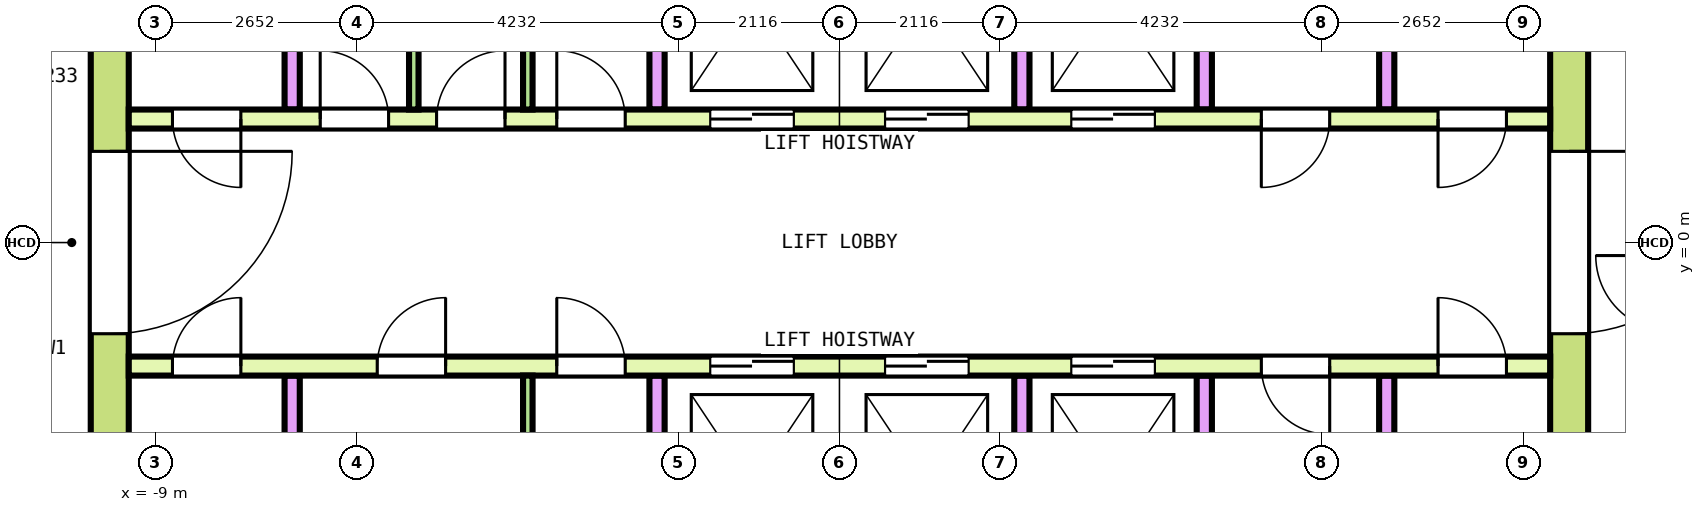
"""IFC4 building model, lengths in metres.
Left out: names, types, materials, properties, quantities, classifications, styles, units other than length and angle.
Written with IfcOpenShell. Run it as: python <this file> out.ifc"""

import sys

from ifc_helpers import new_model, si_unit, direction, frame, frame_2d, origin, place, context, subcontext, project, spatial, rectangle, extrude, element, fill, save


model = new_model("IFC4")
c1 = context("Model", 3, precision=1e-05, world=origin(), true_north=direction((0.0, 1.0)))
c2 = subcontext(c1, "Body", "Model", "MODEL_VIEW")
j1 = project(units=[si_unit("LENGTHUNIT", "METRE"), si_unit("PLANEANGLEUNIT", "RADIAN")], contexts=[c1])
p1 = place(None, origin())
s1 = spatial("IfcSite", under=j1, at=p1, CompositionType="ELEMENT")
p2 = place(p1, origin())
s2 = spatial("IfcBuilding", under=s1, at=p2, CompositionType="ELEMENT")
p3 = place(p2, frame((0.0, 0.0, 291.0)))
s3 = spatial("IfcBuildingStorey", under=s2, at=p3, CompositionType="ELEMENT", Elevation=291.0)
p4 = place(p3, frame((-9.6, -7.85, 0.0), z_axis=(0.0, 0.0, 1.0), x_axis=(0.0, 1.0, 0.0)))
e1 = element("IfcWall", 1, at=p4, inside=s3, PredefinedType="SHEAR", context=c2, shape_type="SweptSolid", body=[
    extrude(rectangle(XDim=15.7, YDim=0.5, at=frame_2d((7.85, 0.0))), origin(), (0.0, 0.0, 1.0), 3.7),
])
p5 = place(p4, frame((6.65, 0.0, 0.0)))
e2 = element("IfcOpeningElement", 2, at=p5, cuts=e1, PredefinedType="OPENING", context=c2, shape_type="SweptSolid", body=[
    extrude(rectangle(XDim=2.4, YDim=2.1, at=frame_2d((1.2, 1.05))), frame((0.0, 0.26, 0.0), z_axis=(0.0, -1.0, 0.0), x_axis=(1.0, 0.0, 0.0)), (0.0, 0.0, 1.0), 0.52),
])
p6 = place(p4, frame((13.55, 0.0, 0.0)))
e3 = element("IfcOpeningElement", 3, at=p6, cuts=e1, PredefinedType="OPENING", context=c2, shape_type="SweptSolid", body=[
    extrude(rectangle(XDim=1.2, YDim=2.1, at=frame_2d((0.6, 1.05))), frame((0.0, 0.26, 0.0), z_axis=(0.0, -1.0, 0.0), x_axis=(1.0, 0.0, 0.0)), (0.0, 0.0, 1.0), 0.52),
])
p7 = place(p4, frame((0.95, 0.0, 0.0)))
e4 = element("IfcOpeningElement", 4, at=p7, cuts=e1, PredefinedType="OPENING", context=c2, shape_type="SweptSolid", body=[
    extrude(rectangle(XDim=1.2, YDim=2.1, at=frame_2d((0.6, 1.05))), frame((0.0, 0.26, 0.0), z_axis=(0.0, -1.0, 0.0), x_axis=(1.0, 0.0, 0.0)), (0.0, 0.0, 1.0), 0.52),
])
p8 = place(p3, frame((9.6, -7.85, 0.0), z_axis=(0.0, 0.0, 1.0), x_axis=(0.0, 1.0, 0.0)))
e5 = element("IfcWall", 5, at=p8, inside=s3, PredefinedType="SHEAR", context=c2, shape_type="SweptSolid", body=[
    extrude(rectangle(XDim=15.7, YDim=0.5, at=frame_2d((7.85, 0.0))), origin(), (0.0, 0.0, 1.0), 3.7),
])
p9 = place(p8, frame((6.65, 0.0, 0.0)))
e6 = element("IfcOpeningElement", 6, at=p9, cuts=e5, PredefinedType="OPENING", context=c2, shape_type="SweptSolid", body=[
    extrude(rectangle(XDim=2.4, YDim=2.1, at=frame_2d((1.2, 1.05))), frame((0.0, 0.26, 0.0), z_axis=(0.0, -1.0, 0.0), x_axis=(1.0, 0.0, 0.0)), (0.0, 0.0, 1.0), 0.52),
])
p10 = place(p8, frame((13.55, 0.0, 0.0)))
e7 = element("IfcOpeningElement", 7, at=p10, cuts=e5, PredefinedType="OPENING", context=c2, shape_type="SweptSolid", body=[
    extrude(rectangle(XDim=1.2, YDim=2.1, at=frame_2d((0.6, 1.05))), frame((0.0, 0.26, 0.0), z_axis=(0.0, -1.0, 0.0), x_axis=(1.0, 0.0, 0.0)), (0.0, 0.0, 1.0), 0.52),
])
p11 = place(p8, frame((1.05, 0.0, 0.0)))
e8 = element("IfcOpeningElement", 8, at=p11, cuts=e5, PredefinedType="OPENING", context=c2, shape_type="SweptSolid", body=[
    extrude(rectangle(XDim=1.0, YDim=2.1, at=frame_2d((0.5, 1.05))), frame((0.0, 0.26, 0.0), z_axis=(0.0, -1.0, 0.0), x_axis=(1.0, 0.0, 0.0)), (0.0, 0.0, 1.0), 0.52),
])
p12 = place(p3, frame((-9.35, 1.625, 0.0), z_axis=(0.0, 0.0, 1.0), x_axis=(1.0, 0.0, 0.0)))
e9 = element("IfcWall", 9, at=p12, inside=s3, PredefinedType="SOLIDWALL", context=c2, shape_type="SweptSolid", body=[
    extrude(rectangle(XDim=18.7, YDim=0.25, at=frame_2d((9.35, 0.0))), origin(), (0.0, 0.0, 1.0), 3.7),
])
p13 = place(p12, frame((7.65, 0.0, 0.0)))
e10 = element("IfcOpeningElement", 10, at=p13, cuts=e9, PredefinedType="OPENING", context=c2, shape_type="SweptSolid", body=[
    extrude(rectangle(XDim=1.1, YDim=2.1, at=frame_2d((0.55, 1.05))), frame((0.0, 0.135, 0.0), z_axis=(0.0, -1.0, 0.0), x_axis=(1.0, 0.0, 0.0)), (0.0, 0.0, 1.0), 0.27),
])
p14 = place(p12, frame((9.95, 0.0, 0.0)))
e11 = element("IfcOpeningElement", 11, at=p14, cuts=e9, PredefinedType="OPENING", context=c2, shape_type="SweptSolid", body=[
    extrude(rectangle(XDim=1.1, YDim=2.1, at=frame_2d((0.55, 1.05))), frame((0.0, 0.135, 0.0), z_axis=(0.0, -1.0, 0.0), x_axis=(1.0, 0.0, 0.0)), (0.0, 0.0, 1.0), 0.27),
])
p15 = place(p12, frame((12.4, 0.0, 0.0)))
e12 = element("IfcOpeningElement", 12, at=p15, cuts=e9, PredefinedType="OPENING", context=c2, shape_type="SweptSolid", body=[
    extrude(rectangle(XDim=1.1, YDim=2.1, at=frame_2d((0.55, 1.05))), frame((0.0, 0.135, 0.0), z_axis=(0.0, -1.0, 0.0), x_axis=(1.0, 0.0, 0.0)), (0.0, 0.0, 1.0), 0.27),
])
p16 = place(p12, frame((0.575, 0.0, 0.0)))
e13 = element("IfcOpeningElement", 13, at=p16, cuts=e9, PredefinedType="OPENING", context=c2, shape_type="SweptSolid", body=[
    extrude(rectangle(XDim=0.9, YDim=2.1, at=frame_2d((0.45, 1.05))), frame((0.0, 0.135, 0.0), z_axis=(0.0, -1.0, 0.0), x_axis=(1.0, 0.0, 0.0)), (0.0, 0.0, 1.0), 0.27),
])
p17 = place(p12, frame((2.519, 0.0, 0.0)))
e14 = element("IfcOpeningElement", 14, at=p17, cuts=e9, PredefinedType="OPENING", context=c2, shape_type="SweptSolid", body=[
    extrude(rectangle(XDim=0.9, YDim=2.1, at=frame_2d((0.45, 1.05))), frame((0.0, 0.135, 0.0), z_axis=(0.0, -1.0, 0.0), x_axis=(1.0, 0.0, 0.0)), (0.0, 0.0, 1.0), 0.27),
])
p18 = place(p12, frame((4.05, 0.0, 0.0)))
e15 = element("IfcOpeningElement", 15, at=p18, cuts=e9, PredefinedType="OPENING", context=c2, shape_type="SweptSolid", body=[
    extrude(rectangle(XDim=0.9, YDim=2.1, at=frame_2d((0.45, 1.05))), frame((0.0, 0.135, 0.0), z_axis=(0.0, -1.0, 0.0), x_axis=(1.0, 0.0, 0.0)), (0.0, 0.0, 1.0), 0.27),
])
p19 = place(p12, frame((5.631, 0.0, 0.0)))
e16 = element("IfcOpeningElement", 16, at=p19, cuts=e9, PredefinedType="OPENING", context=c2, shape_type="SweptSolid", body=[
    extrude(rectangle(XDim=0.9, YDim=2.1, at=frame_2d((0.45, 1.05))), frame((0.0, 0.135, 0.0), z_axis=(0.0, -1.0, 0.0), x_axis=(1.0, 0.0, 0.0)), (0.0, 0.0, 1.0), 0.27),
])
p20 = place(p12, frame((14.9, 0.0, 0.0)))
e17 = element("IfcOpeningElement", 17, at=p20, cuts=e9, PredefinedType="OPENING", context=c2, shape_type="SweptSolid", body=[
    extrude(rectangle(XDim=0.9, YDim=2.1, at=frame_2d((0.45, 1.05))), frame((0.0, 0.135, 0.0), z_axis=(0.0, -1.0, 0.0), x_axis=(1.0, 0.0, 0.0)), (0.0, 0.0, 1.0), 0.27),
])
p21 = place(p12, frame((17.225, 0.0, 0.0)))
e18 = element("IfcOpeningElement", 18, at=p21, cuts=e9, PredefinedType="OPENING", context=c2, shape_type="SweptSolid", body=[
    extrude(rectangle(XDim=0.9, YDim=2.1, at=frame_2d((0.45, 1.05))), frame((0.0, 0.135, 0.0), z_axis=(0.0, -1.0, 0.0), x_axis=(1.0, 0.0, 0.0)), (0.0, 0.0, 1.0), 0.27),
])
for number, where, z_axis, x_axis in (
    (19, (-7.2, 1.75, 0.0), (0.0, 0.0, 1.0), (0.0, 1.0, 0.0)),
    (20, (-2.4, 1.75, 0.0), (0.0, 0.0, 1.0), (0.0, 1.0, 0.0)),
    (21, (2.4, 1.75, 0.0), (0.0, 0.0, 1.0), (0.0, 1.0, 0.0)),
    (22, (4.8, 1.75, 0.0), (0.0, 0.0, 1.0), (0.0, 1.0, 0.0)),
    (23, (7.2, 1.75, 0.0), (0.0, 0.0, 1.0), (0.0, 1.0, 0.0)),
):
    element("IfcWall", number, at=place(p3, frame(where, z_axis=z_axis, x_axis=x_axis)), inside=s3, PredefinedType="SOLIDWALL", context=c2, shape_type="SweptSolid", body=[
        extrude(rectangle(XDim=2.9, YDim=0.2, at=frame_2d((1.45, 0.0))), origin(), (0.0, 0.0, 1.0), 3.7),
    ])
p22 = place(p3, frame((-9.35, -1.625, 0.0), z_axis=(0.0, 0.0, 1.0), x_axis=(1.0, 0.0, 0.0)))
e24 = element("IfcWall", 24, at=p22, inside=s3, PredefinedType="SOLIDWALL", context=c2, shape_type="SweptSolid", body=[
    extrude(rectangle(XDim=18.7, YDim=0.25, at=frame_2d((9.35, 0.0))), origin(), (0.0, 0.0, 1.0), 3.7),
])
p23 = place(p22, frame((7.65, 0.0, 0.0)))
e25 = element("IfcOpeningElement", 25, at=p23, cuts=e24, PredefinedType="OPENING", context=c2, shape_type="SweptSolid", body=[
    extrude(rectangle(XDim=1.1, YDim=2.1, at=frame_2d((0.55, 1.05))), frame((0.0, 0.135, 0.0), z_axis=(0.0, -1.0, 0.0), x_axis=(1.0, 0.0, 0.0)), (0.0, 0.0, 1.0), 0.27),
])
p24 = place(p22, frame((9.95, 0.0, 0.0)))
e26 = element("IfcOpeningElement", 26, at=p24, cuts=e24, PredefinedType="OPENING", context=c2, shape_type="SweptSolid", body=[
    extrude(rectangle(XDim=1.1, YDim=2.1, at=frame_2d((0.55, 1.05))), frame((0.0, 0.135, 0.0), z_axis=(0.0, -1.0, 0.0), x_axis=(1.0, 0.0, 0.0)), (0.0, 0.0, 1.0), 0.27),
])
p25 = place(p22, frame((12.4, 0.0, 0.0)))
e27 = element("IfcOpeningElement", 27, at=p25, cuts=e24, PredefinedType="OPENING", context=c2, shape_type="SweptSolid", body=[
    extrude(rectangle(XDim=1.1, YDim=2.1, at=frame_2d((0.55, 1.05))), frame((0.0, 0.135, 0.0), z_axis=(0.0, -1.0, 0.0), x_axis=(1.0, 0.0, 0.0)), (0.0, 0.0, 1.0), 0.27),
])
p26 = place(p22, frame((0.575, 0.0, 0.0)))
e28 = element("IfcOpeningElement", 28, at=p26, cuts=e24, PredefinedType="OPENING", context=c2, shape_type="SweptSolid", body=[
    extrude(rectangle(XDim=0.9, YDim=2.1, at=frame_2d((0.45, 1.05))), frame((0.0, 0.135, 0.0), z_axis=(0.0, -1.0, 0.0), x_axis=(1.0, 0.0, 0.0)), (0.0, 0.0, 1.0), 0.27),
])
p27 = place(p22, frame((3.269, 0.0, 0.0)))
e29 = element("IfcOpeningElement", 29, at=p27, cuts=e24, PredefinedType="OPENING", context=c2, shape_type="SweptSolid", body=[
    extrude(rectangle(XDim=0.9, YDim=2.1, at=frame_2d((0.45, 1.05))), frame((0.0, 0.135, 0.0), z_axis=(0.0, -1.0, 0.0), x_axis=(1.0, 0.0, 0.0)), (0.0, 0.0, 1.0), 0.27),
])
p28 = place(p22, frame((5.631, 0.0, 0.0)))
e30 = element("IfcOpeningElement", 30, at=p28, cuts=e24, PredefinedType="OPENING", context=c2, shape_type="SweptSolid", body=[
    extrude(rectangle(XDim=0.9, YDim=2.1, at=frame_2d((0.45, 1.05))), frame((0.0, 0.135, 0.0), z_axis=(0.0, -1.0, 0.0), x_axis=(1.0, 0.0, 0.0)), (0.0, 0.0, 1.0), 0.27),
])
p29 = place(p22, frame((14.9, 0.0, 0.0)))
e31 = element("IfcOpeningElement", 31, at=p29, cuts=e24, PredefinedType="OPENING", context=c2, shape_type="SweptSolid", body=[
    extrude(rectangle(XDim=0.9, YDim=2.1, at=frame_2d((0.45, 1.05))), frame((0.0, 0.135, 0.0), z_axis=(0.0, -1.0, 0.0), x_axis=(1.0, 0.0, 0.0)), (0.0, 0.0, 1.0), 0.27),
])
p30 = place(p22, frame((17.225, 0.0, 0.0)))
e32 = element("IfcOpeningElement", 32, at=p30, cuts=e24, PredefinedType="OPENING", context=c2, shape_type="SweptSolid", body=[
    extrude(rectangle(XDim=0.9, YDim=2.1, at=frame_2d((0.45, 1.05))), frame((0.0, 0.135, 0.0), z_axis=(0.0, -1.0, 0.0), x_axis=(1.0, 0.0, 0.0)), (0.0, 0.0, 1.0), 0.27),
])
for number, where, z_axis, x_axis in (
    (33, (-7.2, -4.65, 0.0), (0.0, 0.0, 1.0), (0.0, 1.0, 0.0)),
    (34, (-2.4, -4.65, 0.0), (0.0, 0.0, 1.0), (0.0, 1.0, 0.0)),
    (35, (2.4, -4.65, 0.0), (0.0, 0.0, 1.0), (0.0, 1.0, 0.0)),
    (36, (4.8, -4.65, 0.0), (0.0, 0.0, 1.0), (0.0, 1.0, 0.0)),
    (37, (7.2, -4.65, 0.0), (0.0, 0.0, 1.0), (0.0, 1.0, 0.0)),
):
    element("IfcWall", number, at=place(p3, frame(where, z_axis=z_axis, x_axis=x_axis)), inside=s3, PredefinedType="SOLIDWALL", context=c2, shape_type="SweptSolid", body=[
        extrude(rectangle(XDim=2.9, YDim=0.2, at=frame_2d((1.45, 0.0))), origin(), (0.0, 0.0, 1.0), 3.7),
    ])
for number, where, z_axis, x_axis in (
    (38, (-5.6, 1.75, 0.0), (0.0, 0.0, 1.0), (0.0, 1.0, 0.0)),
    (39, (-4.1, 1.75, 0.0), (0.0, 0.0, 1.0), (0.0, 1.0, 0.0)),
    (40, (-4.1, -4.65, 0.0), (0.0, 0.0, 1.0), (0.0, 1.0, 0.0)),
):
    element("IfcWall", number, at=place(p3, frame(where, z_axis=z_axis, x_axis=x_axis)), inside=s3, PredefinedType="PARTITIONING", context=c2, shape_type="SweptSolid", body=[
        extrude(rectangle(XDim=2.9, YDim=0.125, at=frame_2d((1.45, 0.0))), origin(), (0.0, 0.0, 1.0), 3.7),
    ])
p31 = place(p13, origin())
e41 = element("IfcDoor", 41, at=p31, inside=s3, OperationType="DOUBLE_DOOR_SLIDING", PredefinedType="DOOR", context=c2, shape_type="SweptSolid", body=[
    extrude(rectangle(XDim=1.1, YDim=2.1, at=frame_2d((0.55, 1.05))), frame((0.0, 0.075, 0.0), z_axis=(0.0, -1.0, 0.0), x_axis=(1.0, 0.0, 0.0)), (0.0, 0.0, 1.0), 0.15),
])
fill(e10, e41)
p32 = place(p14, origin())
e42 = element("IfcDoor", 42, at=p32, inside=s3, OperationType="DOUBLE_DOOR_SLIDING", PredefinedType="DOOR", context=c2, shape_type="SweptSolid", body=[
    extrude(rectangle(XDim=1.1, YDim=2.1, at=frame_2d((0.55, 1.05))), frame((0.0, 0.075, 0.0), z_axis=(0.0, -1.0, 0.0), x_axis=(1.0, 0.0, 0.0)), (0.0, 0.0, 1.0), 0.15),
])
fill(e11, e42)
p33 = place(p15, origin())
e43 = element("IfcDoor", 43, at=p33, inside=s3, OperationType="DOUBLE_DOOR_SLIDING", PredefinedType="DOOR", context=c2, shape_type="SweptSolid", body=[
    extrude(rectangle(XDim=1.1, YDim=2.1, at=frame_2d((0.55, 1.05))), frame((0.0, 0.075, 0.0), z_axis=(0.0, -1.0, 0.0), x_axis=(1.0, 0.0, 0.0)), (0.0, 0.0, 1.0), 0.15),
])
fill(e12, e43)
p34 = place(p23, origin())
e44 = element("IfcDoor", 44, at=p34, inside=s3, OperationType="DOUBLE_DOOR_SLIDING", PredefinedType="DOOR", context=c2, shape_type="SweptSolid", body=[
    extrude(rectangle(XDim=1.1, YDim=2.1, at=frame_2d((0.55, 1.05))), frame((0.0, 0.075, 0.0), z_axis=(0.0, -1.0, 0.0), x_axis=(1.0, 0.0, 0.0)), (0.0, 0.0, 1.0), 0.15),
])
fill(e25, e44)
p35 = place(p24, origin())
e45 = element("IfcDoor", 45, at=p35, inside=s3, OperationType="DOUBLE_DOOR_SLIDING", PredefinedType="DOOR", context=c2, shape_type="SweptSolid", body=[
    extrude(rectangle(XDim=1.1, YDim=2.1, at=frame_2d((0.55, 1.05))), frame((0.0, 0.075, 0.0), z_axis=(0.0, -1.0, 0.0), x_axis=(1.0, 0.0, 0.0)), (0.0, 0.0, 1.0), 0.15),
])
fill(e26, e45)
p36 = place(p25, origin())
e46 = element("IfcDoor", 46, at=p36, inside=s3, OperationType="DOUBLE_DOOR_SLIDING", PredefinedType="DOOR", context=c2, shape_type="SweptSolid", body=[
    extrude(rectangle(XDim=1.1, YDim=2.1, at=frame_2d((0.55, 1.05))), frame((0.0, 0.075, 0.0), z_axis=(0.0, -1.0, 0.0), x_axis=(1.0, 0.0, 0.0)), (0.0, 0.0, 1.0), 0.15),
])
fill(e27, e46)
p37 = place(p5, origin())
e47 = element("IfcDoor", 47, at=p37, inside=s3, OperationType="DOUBLE_DOOR_SINGLE_SWING", PredefinedType="DOOR", context=c2, shape_type="SweptSolid", body=[
    extrude(rectangle(XDim=2.4, YDim=2.1, at=frame_2d((1.2, 1.05))), frame((0.0, 0.2, 0.0), z_axis=(0.0, -1.0, 0.0), x_axis=(1.0, 0.0, 0.0)), (0.0, 0.0, 1.0), 0.4),
])
fill(e2, e47)
p38 = place(p9, origin())
e48 = element("IfcDoor", 48, at=p38, inside=s3, OperationType="DOUBLE_DOOR_SINGLE_SWING", PredefinedType="DOOR", context=c2, shape_type="SweptSolid", body=[
    extrude(rectangle(XDim=2.4, YDim=2.1, at=frame_2d((1.2, 1.05))), frame((0.0, 0.2, 0.0), z_axis=(0.0, -1.0, 0.0), x_axis=(1.0, 0.0, 0.0)), (0.0, 0.0, 1.0), 0.4),
])
fill(e6, e48)
p39 = place(p16, origin())
e49 = element("IfcDoor", 49, at=p39, inside=s3, OperationType="SINGLE_SWING_LEFT", PredefinedType="DOOR", context=c2, shape_type="SweptSolid", body=[
    extrude(rectangle(XDim=0.9, YDim=2.1, at=frame_2d((0.45, 1.05))), frame((0.0, 0.075, 0.0), z_axis=(0.0, -1.0, 0.0), x_axis=(1.0, 0.0, 0.0)), (0.0, 0.0, 1.0), 0.15),
])
fill(e13, e49)
p40 = place(p17, origin())
e50 = element("IfcDoor", 50, at=p40, inside=s3, OperationType="SINGLE_SWING_RIGHT", PredefinedType="DOOR", context=c2, shape_type="SweptSolid", body=[
    extrude(rectangle(XDim=0.9, YDim=2.1, at=frame_2d((0.45, 1.05))), frame((0.0, 0.075, 0.0), z_axis=(0.0, -1.0, 0.0), x_axis=(1.0, 0.0, 0.0)), (0.0, 0.0, 1.0), 0.15),
])
fill(e14, e50)
p41 = place(p18, origin())
e51 = element("IfcDoor", 51, at=p41, inside=s3, OperationType="SINGLE_SWING_LEFT", PredefinedType="DOOR", context=c2, shape_type="SweptSolid", body=[
    extrude(rectangle(XDim=0.9, YDim=2.1, at=frame_2d((0.45, 1.05))), frame((0.0, 0.075, 0.0), z_axis=(0.0, -1.0, 0.0), x_axis=(1.0, 0.0, 0.0)), (0.0, 0.0, 1.0), 0.15),
])
fill(e15, e51)
p42 = place(p19, origin())
e52 = element("IfcDoor", 52, at=p42, inside=s3, OperationType="SINGLE_SWING_RIGHT", PredefinedType="DOOR", context=c2, shape_type="SweptSolid", body=[
    extrude(rectangle(XDim=0.9, YDim=2.1, at=frame_2d((0.45, 1.05))), frame((0.0, 0.075, 0.0), z_axis=(0.0, -1.0, 0.0), x_axis=(1.0, 0.0, 0.0)), (0.0, 0.0, 1.0), 0.15),
])
fill(e16, e52)
p43 = place(p20, origin())
e53 = element("IfcDoor", 53, at=p43, inside=s3, OperationType="SINGLE_SWING_LEFT", PredefinedType="DOOR", context=c2, shape_type="SweptSolid", body=[
    extrude(rectangle(XDim=0.9, YDim=2.1, at=frame_2d((0.45, 1.05))), frame((0.0, 0.075, 0.0), z_axis=(0.0, -1.0, 0.0), x_axis=(1.0, 0.0, 0.0)), (0.0, 0.0, 1.0), 0.15),
])
fill(e17, e53)
p44 = place(p21, origin())
e54 = element("IfcDoor", 54, at=p44, inside=s3, OperationType="SINGLE_SWING_RIGHT", PredefinedType="DOOR", context=c2, shape_type="SweptSolid", body=[
    extrude(rectangle(XDim=0.9, YDim=2.1, at=frame_2d((0.45, 1.05))), frame((0.0, 0.075, 0.0), z_axis=(0.0, -1.0, 0.0), x_axis=(1.0, 0.0, 0.0)), (0.0, 0.0, 1.0), 0.15),
])
fill(e18, e54)
p45 = place(p26, origin())
e55 = element("IfcDoor", 55, at=p45, inside=s3, OperationType="SINGLE_SWING_LEFT", PredefinedType="DOOR", context=c2, shape_type="SweptSolid", body=[
    extrude(rectangle(XDim=0.9, YDim=2.1, at=frame_2d((0.45, 1.05))), frame((0.0, 0.075, 0.0), z_axis=(0.0, -1.0, 0.0), x_axis=(1.0, 0.0, 0.0)), (0.0, 0.0, 1.0), 0.15),
])
fill(e28, e55)
p46 = place(p27, origin())
e56 = element("IfcDoor", 56, at=p46, inside=s3, OperationType="SINGLE_SWING_RIGHT", PredefinedType="DOOR", context=c2, shape_type="SweptSolid", body=[
    extrude(rectangle(XDim=0.9, YDim=2.1, at=frame_2d((0.45, 1.05))), frame((0.0, 0.075, 0.0), z_axis=(0.0, -1.0, 0.0), x_axis=(1.0, 0.0, 0.0)), (0.0, 0.0, 1.0), 0.15),
])
fill(e29, e56)
p47 = place(p28, origin())
e57 = element("IfcDoor", 57, at=p47, inside=s3, OperationType="SINGLE_SWING_LEFT", PredefinedType="DOOR", context=c2, shape_type="SweptSolid", body=[
    extrude(rectangle(XDim=0.9, YDim=2.1, at=frame_2d((0.45, 1.05))), frame((0.0, 0.075, 0.0), z_axis=(0.0, -1.0, 0.0), x_axis=(1.0, 0.0, 0.0)), (0.0, 0.0, 1.0), 0.15),
])
fill(e30, e57)
p48 = place(p29, origin())
e58 = element("IfcDoor", 58, at=p48, inside=s3, OperationType="SINGLE_SWING_RIGHT", PredefinedType="DOOR", context=c2, shape_type="SweptSolid", body=[
    extrude(rectangle(XDim=0.9, YDim=2.1, at=frame_2d((0.45, 1.05))), frame((0.0, 0.075, 0.0), z_axis=(0.0, -1.0, 0.0), x_axis=(1.0, 0.0, 0.0)), (0.0, 0.0, 1.0), 0.15),
])
fill(e31, e58)
p49 = place(p30, origin())
e59 = element("IfcDoor", 59, at=p49, inside=s3, OperationType="SINGLE_SWING_LEFT", PredefinedType="DOOR", context=c2, shape_type="SweptSolid", body=[
    extrude(rectangle(XDim=0.9, YDim=2.1, at=frame_2d((0.45, 1.05))), frame((0.0, 0.075, 0.0), z_axis=(0.0, -1.0, 0.0), x_axis=(1.0, 0.0, 0.0)), (0.0, 0.0, 1.0), 0.15),
])
fill(e32, e59)
save(model, sys.argv[1])
